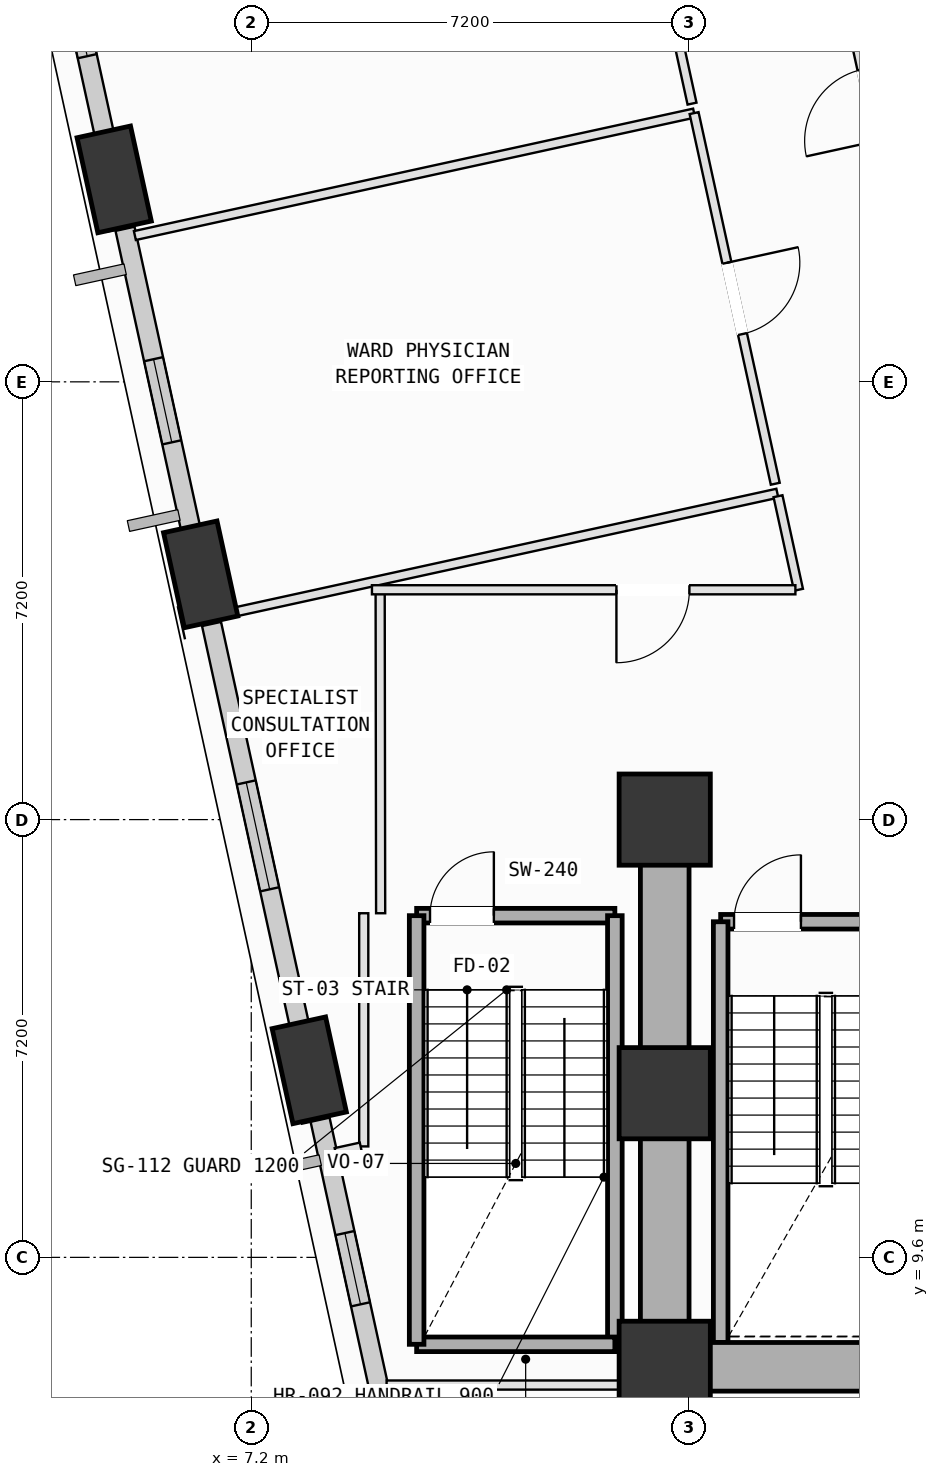
"""IFC4 building model, lengths in metres.
Left out: names, types, materials, properties, quantities, classifications, styles, units other than length and angle.
Written with IfcOpenShell. Run it as: python <this file> out.ifc"""

import sys

from ifc_helpers import new_model, si_unit, direction, frame, frame_2d, origin, origin_2d, place, context, subcontext, project, spatial, rectangle, extrude, element, fill, save


model = new_model("IFC4")
c1 = context("Model", 3, precision=1e-05, world=origin(), true_north=direction((0.0, 1.0)))
c2 = subcontext(c1, "Body", "Model", "MODEL_VIEW")
j1 = project(units=[si_unit("LENGTHUNIT", "METRE"), si_unit("PLANEANGLEUNIT", "RADIAN")], contexts=[c1])
p1 = place(None, origin())
s1 = spatial("IfcSite", under=j1, at=p1, CompositionType="ELEMENT")
p2 = place(p1, origin())
s2 = spatial("IfcBuilding", under=s1, at=p2, CompositionType="ELEMENT")
p3 = place(p2, frame((0.0, 0.0, 75.0)))
s3 = spatial("IfcBuildingStorey", under=s2, at=p3, CompositionType="ELEMENT", Elevation=75.0)
for number, where, z_axis, x_axis in (
    (1, (14.0, 7.8, 0.0), (0.0, 0.0, 1.0), (1.0, 0.0, 0.0)),
    (2, (14.0, 12.3, 0.0), (0.0, 0.0, 1.0), (1.0, 0.0, 0.0)),
    (3, (14.0, 16.8, 0.0), (0.0, 0.0, 1.0), (1.0, 0.0, 0.0)),
):
    element("IfcColumn", number, at=place(p3, frame(where, z_axis=z_axis, x_axis=x_axis)), inside=s3, PredefinedType="COLUMN", context=c2, shape_type="SweptSolid", body=[
        extrude(rectangle(XDim=1.5, YDim=1.5, at=origin_2d()), origin(), (0.0, 0.0, 1.0), 4.0),
    ])
p4 = place(p3, frame((4.946, 27.33, 0.002), z_axis=(-0.009462642807, -0.11797974525, 0.992970915033), x_axis=(-0.13564841396, 0.983987596197, 0.115619714235)))
e4 = element("IfcColumn", 4, at=p4, inside=s3, PredefinedType="COLUMN", context=c2, shape_type="SweptSolid", body=[
    extrude(rectangle(XDim=1.6, YDim=0.9, at=origin_2d()), origin(), (0.0, 0.0, 1.0), 4.025),
])
p5 = place(p3, frame((6.368, 20.833, 0.002), z_axis=(0.017237098088, -0.111980443564, 0.993560900352), x_axis=(-0.359053352407, 0.926731450356, 0.110677500183)))
e5 = element("IfcColumn", 5, at=p5, inside=s3, PredefinedType="COLUMN", context=c2, shape_type="SweptSolid", body=[
    extrude(rectangle(XDim=1.6, YDim=0.9, at=origin_2d()), origin(), (0.0, 0.0, 1.0), 4.022),
])
p6 = place(p3, frame((8.154, 12.677, 0.002), z_axis=(0.050784905492, -0.104300182247, 0.993248390564), x_axis=(-0.617055548665, 0.778717180354, 0.113322561226)))
e6 = element("IfcColumn", 6, at=p6, inside=s3, PredefinedType="COLUMN", context=c2, shape_type="SweptSolid", body=[
    extrude(rectangle(XDim=1.6, YDim=0.9, at=origin_2d()), origin(), (0.0, 0.0, 1.0), 4.024),
])
p7 = place(p3, frame((4.865, 27.697, 0.0), z_axis=(0.0, 0.0, 1.0), x_axis=(-0.213870791001, 0.976861957882, 0.0)))
e7 = element("IfcWall", 7, at=p7, inside=s3, PredefinedType="SOLIDWALL", context=c2, shape_type="SweptSolid", body=[
    extrude(rectangle(XDim=5.401, YDim=0.32, at=frame_2d((2.7, 0.0))), origin(), (0.0, 0.0, 1.0), 3.165),
])
p8 = place(p7, frame((1.698, 0.0, 0.75)))
e8 = element("IfcOpeningElement", 8, at=p8, cuts=e7, PredefinedType="OPENING", context=c2, shape_type="SweptSolid", body=[
    extrude(rectangle(XDim=2.0, YDim=1.95, at=frame_2d((1.0, 0.975))), frame((0.0, 0.17, 0.0), z_axis=(0.0, -1.0, 0.0), x_axis=(1.0, 0.0, 0.0)), (0.0, 0.0, 1.0), 0.34),
])
p9 = place(p3, frame((6.287, 21.205, 0.0), z_axis=(0.0, 0.0, 1.0), x_axis=(-0.21388700502, 0.976858407899, 0.0)))
e9 = element("IfcWall", 9, at=p9, inside=s3, PredefinedType="SOLIDWALL", context=c2, shape_type="SweptSolid", body=[
    extrude(rectangle(XDim=5.438, YDim=0.32, at=frame_2d((2.719, 0.0))), origin(), (0.0, 0.0, 1.0), 3.165),
])
p10 = place(p9, frame((1.843, 0.0, 0.75)))
e10 = element("IfcOpeningElement", 10, at=p10, cuts=e9, PredefinedType="OPENING", context=c2, shape_type="SweptSolid", body=[
    extrude(rectangle(XDim=1.4, YDim=1.85, at=frame_2d((0.7, 0.925))), frame((0.0, 0.17, 0.0), z_axis=(0.0, -1.0, 0.0), x_axis=(1.0, 0.0, 0.0)), (0.0, 0.0, 1.0), 0.34),
])
p11 = place(p3, frame((8.073, 13.046, 0.0), z_axis=(0.0, 0.0, 1.0), x_axis=(-0.213886644923, 0.976858486744, 0.0)))
e11 = element("IfcWall", 11, at=p11, inside=s3, PredefinedType="SOLIDWALL", context=c2, shape_type="SweptSolid", body=[
    extrude(rectangle(XDim=7.136, YDim=0.32, at=frame_2d((3.568, 0.0))), origin(), (0.0, 0.0, 1.0), 3.165),
])
p12 = place(p11, frame((2.669, 0.0, 0.75)))
e12 = element("IfcOpeningElement", 12, at=p12, cuts=e11, PredefinedType="OPENING", context=c2, shape_type="SweptSolid", body=[
    extrude(rectangle(XDim=1.8, YDim=2.05, at=frame_2d((0.9, 1.025))), frame((0.0, 0.17, 0.0), z_axis=(0.0, -1.0, 0.0), x_axis=(1.0, 0.0, 0.0)), (0.0, 0.0, 1.0), 0.34),
])
p13 = place(p3, frame((9.615, 6.005, 0.0), z_axis=(0.0, 0.0, 1.0), x_axis=(-0.213886269433, 0.976858568959, 0.0)))
e13 = element("IfcWall", 13, at=p13, inside=s3, PredefinedType="SOLIDWALL", context=c2, shape_type="SweptSolid", body=[
    extrude(rectangle(XDim=5.997, YDim=0.32, at=frame_2d((2.999, 0.0))), origin(), (0.0, 0.0, 1.0), 3.165),
])
p14 = place(p13, frame((2.889, 0.0, 0.75)))
e14 = element("IfcOpeningElement", 14, at=p14, cuts=e13, PredefinedType="OPENING", context=c2, shape_type="SweptSolid", body=[
    extrude(rectangle(XDim=1.2, YDim=1.75, at=frame_2d((0.6, 0.875))), frame((0.0, 0.17, 0.0), z_axis=(0.0, -1.0, 0.0), x_axis=(1.0, 0.0, 0.0)), (0.0, 0.0, 1.0), 0.34),
])
p15 = place(p3, frame((14.92, 15.12, 0.0), z_axis=(0.0, 0.0, 1.0), x_axis=(1.0, 0.0, 0.0)))
e15 = element("IfcWall", 15, at=p15, inside=s3, PredefinedType="SOLIDWALL", context=c2, shape_type="SweptSolid", body=[
    extrude(rectangle(XDim=3.46, YDim=0.24, at=frame_2d((1.73, 0.0))), origin(), (0.0, 0.0, 1.0), 3.78),
])
p16 = place(p15, frame((0.22, 0.0, 0.0)))
e16 = element("IfcOpeningElement", 16, at=p16, cuts=e15, PredefinedType="OPENING", context=c2, shape_type="SweptSolid", body=[
    extrude(rectangle(XDim=1.1, YDim=2.15, at=frame_2d((0.55, 1.075))), frame((0.0, 0.13, 0.0), z_axis=(0.0, -1.0, 0.0), x_axis=(1.0, 0.0, 0.0)), (0.0, 0.0, 1.0), 0.26),
])
p17 = place(p3, frame((14.92, 8.2, 0.0), z_axis=(0.0, 0.0, 1.0), x_axis=(0.0, 1.0, 0.0)))
e17 = element("IfcWall", 17, at=p17, inside=s3, PredefinedType="SOLIDWALL", context=c2, shape_type="SweptSolid", body=[
    extrude(rectangle(XDim=6.92, YDim=0.24, at=frame_2d((3.46, 0.0))), origin(), (0.0, 0.0, 1.0), 3.78),
])
p18 = place(p3, frame((9.92, 15.22, 0.0), z_axis=(0.0, 0.0, 1.0), x_axis=(1.0, 0.0, 0.0)))
e18 = element("IfcWall", 18, at=p18, inside=s3, PredefinedType="SOLIDWALL", context=c2, shape_type="SweptSolid", body=[
    extrude(rectangle(XDim=3.26, YDim=0.24, at=frame_2d((1.63, 0.0))), origin(), (0.0, 0.0, 1.0), 3.78),
])
p19 = place(p18, frame((0.22, 0.0, 0.0)))
e19 = element("IfcOpeningElement", 19, at=p19, cuts=e18, PredefinedType="OPENING", context=c2, shape_type="SweptSolid", body=[
    extrude(rectangle(XDim=1.05, YDim=2.15, at=frame_2d((0.525, 1.075))), frame((0.0, 0.13, 0.0), z_axis=(0.0, -1.0, 0.0), x_axis=(1.0, 0.0, 0.0)), (0.0, 0.0, 1.0), 0.26),
])
p20 = place(p3, frame((13.18, 15.22, 0.0), z_axis=(0.0, 0.0, 1.0), x_axis=(0.0, -1.0, 0.0)))
e20 = element("IfcWall", 20, at=p20, inside=s3, PredefinedType="SOLIDWALL", context=c2, shape_type="SweptSolid", body=[
    extrude(rectangle(XDim=7.05, YDim=0.24, at=frame_2d((3.525, 0.0))), origin(), (0.0, 0.0, 1.0), 3.78),
])
p21 = place(p3, frame((13.18, 8.17, 0.0), z_axis=(0.0, 0.0, 1.0), x_axis=(-1.0, 0.0, 0.0)))
e21 = element("IfcWall", 21, at=p21, inside=s3, PredefinedType="SOLIDWALL", context=c2, shape_type="SweptSolid", body=[
    extrude(rectangle(XDim=3.26, YDim=0.24, at=frame_2d((1.63, 0.0))), origin(), (0.0, 0.0, 1.0), 3.78),
])
p22 = place(p3, frame((9.92, 8.17, 0.0), z_axis=(0.0, 0.0, 1.0), x_axis=(0.0, 1.0, 0.0)))
e22 = element("IfcWall", 22, at=p22, inside=s3, PredefinedType="SOLIDWALL", context=c2, shape_type="SweptSolid", body=[
    extrude(rectangle(XDim=7.05, YDim=0.24, at=frame_2d((3.525, 0.0))), origin(), (0.0, 0.0, 1.0), 3.78),
])
p23 = place(p3, frame((14.0, 7.8, 0.0), z_axis=(0.0, 0.0, 1.0), x_axis=(1.0, 0.0, 0.0)))
e23 = element("IfcWall", 23, at=p23, inside=s3, PredefinedType="SHEAR", context=c2, shape_type="SweptSolid", body=[
    extrude(rectangle(XDim=10.8, YDim=0.8, at=frame_2d((5.4, 0.0))), origin(), (0.0, 0.0, 1.0), 3.78),
])
p24 = place(p3, frame((14.0, 16.8, 0.0), z_axis=(0.0, 0.0, 1.0), x_axis=(0.0, -1.0, 0.0)))
e24 = element("IfcWall", 24, at=p24, inside=s3, PredefinedType="SHEAR", context=c2, shape_type="SweptSolid", body=[
    extrude(rectangle(XDim=9.0, YDim=0.8, at=frame_2d((4.5, 0.0))), origin(), (0.0, 0.0, 1.0), 3.78),
])
p25 = place(p3, frame((9.426, 7.5, 0.0), z_axis=(0.0, 0.0, 1.0), x_axis=(1.0, 0.0, 0.0)))
e25 = element("IfcWall", 25, at=p25, inside=s3, PredefinedType="PARTITIONING", context=c2, shape_type="SweptSolid", body=[
    extrude(rectangle(XDim=4.574, YDim=0.15, at=frame_2d((2.287, 0.0))), origin(), (0.0, 0.0, 1.0), 3.78),
])
p26 = place(p3, frame((9.32, 20.55, 0.0), z_axis=(0.0, 0.0, 1.0), x_axis=(0.001476830584, -0.999998909485, 0.0)))
e26 = element("IfcWall", 26, at=p26, inside=s3, PredefinedType="PARTITIONING", context=c2, shape_type="SweptSolid", body=[
    extrude(rectangle(XDim=5.29, YDim=0.15, at=frame_2d((2.645, 0.0))), origin(), (0.0, 0.0, 1.0), 3.78),
])
p27 = place(p3, frame((9.05, 15.26, 0.0), z_axis=(0.0, 0.0, 1.0), x_axis=(0.0, -1.0, 0.0)))
e27 = element("IfcWall", 27, at=p27, inside=s3, PredefinedType="PARTITIONING", context=c2, shape_type="SweptSolid", body=[
    extrude(rectangle(XDim=3.835, YDim=0.15, at=frame_2d((1.917, 0.0))), origin(), (0.0, 0.0, 1.0), 3.78),
])
p28 = place(p3, frame((9.001, 11.414, 0.0), z_axis=(0.0, 0.0, 1.0), x_axis=(-0.977035436629, -0.213076877137, 0.0)))
e28 = element("IfcWall", 28, at=p28, inside=s3, PredefinedType="PARTITIONING", context=c2, shape_type="SweptSolid", body=[
    extrude(rectangle(XDim=0.423, YDim=0.15, at=frame_2d((0.211, 0.0))), origin(), (0.0, 0.0, 1.0), 3.78),
])
p29 = place(p3, frame((8.108, 11.815, 0.0), z_axis=(0.0, 0.0, 1.0), x_axis=(-0.21385331099, 0.976865784731, 0.0)))
e29 = element("IfcWall", 29, at=p29, inside=s3, PredefinedType="PARTITIONING", context=c2, shape_type="SweptSolid", body=[
    extrude(rectangle(XDim=1.21, YDim=0.15, at=frame_2d((0.605, 0.0))), origin(), (0.0, 0.0, 1.0), 3.165),
])
p30 = place(p3, frame((6.6, 20.142, 0.0), z_axis=(0.0, 0.0, 1.0), x_axis=(0.976855600785, 0.213899825188, 0.0)))
e30 = element("IfcWall", 30, at=p30, inside=s3, PredefinedType="PARTITIONING", context=c2, shape_type="SweptSolid", body=[
    extrude(rectangle(XDim=9.471, YDim=0.15, at=frame_2d((4.736, 0.0))), origin(), (0.0, 0.0, 1.0), 3.78),
])
p31 = place(p3, frame((15.863, 22.119, 0.0), z_axis=(0.0, 0.0, 1.0), x_axis=(0.213877135487, -0.97686056882, 0.0)))
e31 = element("IfcWall", 31, at=p31, inside=s3, PredefinedType="PARTITIONING", context=c2, shape_type="SweptSolid", body=[
    extrude(rectangle(XDim=1.575, YDim=0.15, at=frame_2d((0.788, 0.0))), origin(), (0.0, 0.0, 1.0), 3.78),
])
p32 = place(p3, frame((16.149, 20.58, 0.0), z_axis=(0.0, 0.0, 1.0), x_axis=(-1.0, 0.0, 0.0)))
e32 = element("IfcWall", 32, at=p32, inside=s3, PredefinedType="PARTITIONING", context=c2, shape_type="SweptSolid", body=[
    extrude(rectangle(XDim=6.964, YDim=0.15, at=frame_2d((3.482, 0.0))), origin(), (0.0, 0.0, 1.0), 3.78),
])
p33 = place(p32, frame((1.743, 0.0, 0.0)))
e33 = element("IfcOpeningElement", 33, at=p33, cuts=e32, PredefinedType="OPENING", context=c2, shape_type="SweptSolid", body=[
    extrude(rectangle(XDim=1.2, YDim=2.15, at=frame_2d((0.6, 1.075))), frame((0.0, 0.085, 0.0), z_axis=(0.0, -1.0, 0.0), x_axis=(1.0, 0.0, 0.0)), (0.0, 0.0, 1.0), 0.17),
])
p34 = place(p3, frame((5.286, 26.406, 0.0), z_axis=(0.0, 0.0, 1.0), x_axis=(0.976854150105, 0.213906450166, 0.0)))
e34 = element("IfcWall", 34, at=p34, inside=s3, PredefinedType="PARTITIONING", context=c2, shape_type="SweptSolid", body=[
    extrude(rectangle(XDim=9.415, YDim=0.15, at=frame_2d((4.708, 0.0))), origin(), (0.0, 0.0, 1.0), 3.78),
])
p35 = place(p3, frame((14.483, 28.42, 0.0), z_axis=(0.0, 0.0, 1.0), x_axis=(0.213959387343, -0.976842556694, 0.0)))
e35 = element("IfcWall", 35, at=p35, inside=s3, PredefinedType="PARTITIONING", context=c2, shape_type="SweptSolid", body=[
    extrude(rectangle(XDim=6.24, YDim=0.15, at=frame_2d((3.12, 0.0))), origin(), (0.0, 0.0, 1.0), 3.78),
])
p36 = place(p35, frame((2.52, 0.0, 0.0)))
e36 = element("IfcOpeningElement", 36, at=p36, cuts=e35, PredefinedType="OPENING", context=c2, shape_type="SweptSolid", body=[
    extrude(rectangle(XDim=1.2, YDim=2.15, at=frame_2d((0.6, 1.075))), frame((0.0, 0.085, 0.0), z_axis=(0.0, -1.0, 0.0), x_axis=(1.0, 0.0, 0.0)), (0.0, 0.0, 1.0), 0.17),
])
p37 = place(p3, frame((6.264, 20.233, 0.0), z_axis=(0.0, 0.0, 1.0), x_axis=(-0.213673762505, 0.9769050738, 0.0)))
e37 = element("IfcWall", 37, at=p37, inside=s3, PredefinedType="PARTITIONING", context=c2, shape_type="SweptSolid", body=[
    extrude(rectangle(XDim=0.945, YDim=0.15, at=frame_2d((0.472, 0.0))), origin(), (0.0, 0.0, 1.0), 3.165),
])
p38 = place(p3, frame((12.516, 37.407, 0.0), z_axis=(0.0, 0.0, 1.0), x_axis=(0.213809634747, -0.976875345215, 0.0)))
e38 = element("IfcWall", 38, at=p38, inside=s3, PredefinedType="PARTITIONING", context=c2, shape_type="SweptSolid", body=[
    extrude(rectangle(XDim=9.04, YDim=0.15, at=frame_2d((4.52, 0.0))), origin(), (0.0, 0.0, 1.0), 2.865),
])
p39 = place(p38, frame((3.92, 0.0, 0.0)))
e39 = element("IfcOpeningElement", 39, at=p39, cuts=e38, PredefinedType="OPENING", context=c2, shape_type="SweptSolid", body=[
    extrude(rectangle(XDim=1.2, YDim=2.15, at=frame_2d((0.6, 1.075))), frame((0.0, 0.085, 0.0), z_axis=(0.0, -1.0, 0.0), x_axis=(1.0, 0.0, 0.0)), (0.0, 0.0, 1.0), 0.17),
])
p40 = place(p3, frame((4.895, 26.485, 0.0), z_axis=(0.0, 0.0, 1.0), x_axis=(-0.214302312484, 0.976767382166, 0.0)))
e40 = element("IfcWall", 40, at=p40, inside=s3, PredefinedType="PARTITIONING", context=c2, shape_type="SweptSolid", body=[
    extrude(rectangle(XDim=1.19, YDim=0.15, at=frame_2d((0.595, 0.0))), origin(), (0.0, 0.0, 1.0), 3.165),
])
p41 = place(p3, frame((18.415, 23.789, 0.0), z_axis=(0.0, 0.0, 1.0), x_axis=(-0.213853705806, 0.976865698299, 0.0)))
e41 = element("IfcWall", 41, at=p41, inside=s3, PredefinedType="PARTITIONING", context=c2, shape_type="SweptSolid", body=[
    extrude(rectangle(XDim=9.75, YDim=0.15, at=frame_2d((4.875, 0.0))), origin(), (0.0, 0.0, 1.0), 3.78),
])
p42 = place(p41, frame((4.275, 0.0, 0.0)))
e42 = element("IfcOpeningElement", 42, at=p42, cuts=e41, PredefinedType="OPENING", context=c2, shape_type="SweptSolid", body=[
    extrude(rectangle(XDim=1.2, YDim=2.15, at=frame_2d((0.6, 1.075))), frame((0.0, 0.085, 0.0), z_axis=(0.0, -1.0, 0.0), x_axis=(1.0, 0.0, 0.0)), (0.0, 0.0, 1.0), 0.17),
])
p43 = place(p8, origin())
e43 = element("IfcWindow", 43, at=p43, inside=s3, PartitioningType="SINGLE_PANEL", PredefinedType="WINDOW", context=c2, shape_type="SweptSolid", body=[
    extrude(rectangle(XDim=2.0, YDim=1.95, at=frame_2d((1.0, 0.975))), frame((0.0, 0.03, 0.0), z_axis=(0.0, -1.0, 0.0), x_axis=(1.0, 0.0, 0.0)), (0.0, 0.0, 1.0), 0.06),
])
fill(e8, e43)
p44 = place(p10, origin())
e44 = element("IfcWindow", 44, at=p44, inside=s3, PartitioningType="SINGLE_PANEL", PredefinedType="WINDOW", context=c2, shape_type="SweptSolid", body=[
    extrude(rectangle(XDim=1.4, YDim=1.85, at=frame_2d((0.7, 0.925))), frame((0.0, 0.03, 0.0), z_axis=(0.0, -1.0, 0.0), x_axis=(1.0, 0.0, 0.0)), (0.0, 0.0, 1.0), 0.06),
])
fill(e10, e44)
p45 = place(p12, origin())
e45 = element("IfcWindow", 45, at=p45, inside=s3, PartitioningType="SINGLE_PANEL", PredefinedType="WINDOW", context=c2, shape_type="SweptSolid", body=[
    extrude(rectangle(XDim=1.8, YDim=2.05, at=frame_2d((0.9, 1.025))), frame((0.0, 0.03, 0.0), z_axis=(0.0, -1.0, 0.0), x_axis=(1.0, 0.0, 0.0)), (0.0, 0.0, 1.0), 0.06),
])
fill(e12, e45)
p46 = place(p14, origin())
e46 = element("IfcWindow", 46, at=p46, inside=s3, PartitioningType="SINGLE_PANEL", PredefinedType="WINDOW", context=c2, shape_type="SweptSolid", body=[
    extrude(rectangle(XDim=1.2, YDim=1.75, at=frame_2d((0.6, 0.875))), frame((0.0, 0.03, 0.0), z_axis=(0.0, -1.0, 0.0), x_axis=(1.0, 0.0, 0.0)), (0.0, 0.0, 1.0), 0.06),
])
fill(e14, e46)
p47 = place(p16, origin())
e47 = element("IfcDoor", 47, at=p47, inside=s3, OperationType="SINGLE_SWING_RIGHT", PredefinedType="DOOR", context=c2, shape_type="SweptSolid", body=[
    extrude(rectangle(XDim=1.1, YDim=2.15, at=frame_2d((0.55, 1.075))), frame((0.0, 0.025, 0.0), z_axis=(0.0, -1.0, 0.0), x_axis=(1.0, 0.0, 0.0)), (0.0, 0.0, 1.0), 0.05),
])
fill(e16, e47)
p48 = place(p19, origin())
e48 = element("IfcDoor", 48, at=p48, inside=s3, OperationType="SINGLE_SWING_RIGHT", PredefinedType="DOOR", context=c2, shape_type="SweptSolid", body=[
    extrude(rectangle(XDim=1.05, YDim=2.15, at=frame_2d((0.525, 1.075))), frame((0.0, 0.025, 0.0), z_axis=(0.0, -1.0, 0.0), x_axis=(1.0, 0.0, 0.0)), (0.0, 0.0, 1.0), 0.05),
])
fill(e19, e48)
p49 = place(p33, origin())
e49 = element("IfcDoor", 49, at=p49, inside=s3, OperationType="SINGLE_SWING_RIGHT", PredefinedType="DOOR", context=c2, shape_type="SweptSolid", body=[
    extrude(rectangle(XDim=1.2, YDim=2.15, at=frame_2d((0.6, 1.075))), frame((0.0, 0.025, 0.0), z_axis=(0.0, -1.0, 0.0), x_axis=(1.0, 0.0, 0.0)), (0.0, 0.0, 1.0), 0.05),
])
fill(e33, e49)
p50 = place(p36, origin())
e50 = element("IfcDoor", 50, at=p50, inside=s3, OperationType="SINGLE_SWING_LEFT", PredefinedType="DOOR", context=c2, shape_type="SweptSolid", body=[
    extrude(rectangle(XDim=1.2, YDim=2.15, at=frame_2d((0.6, 1.075))), frame((0.0, 0.025, 0.0), z_axis=(0.0, -1.0, 0.0), x_axis=(1.0, 0.0, 0.0)), (0.0, 0.0, 1.0), 0.05),
])
fill(e36, e50)
save(model, sys.argv[1])
